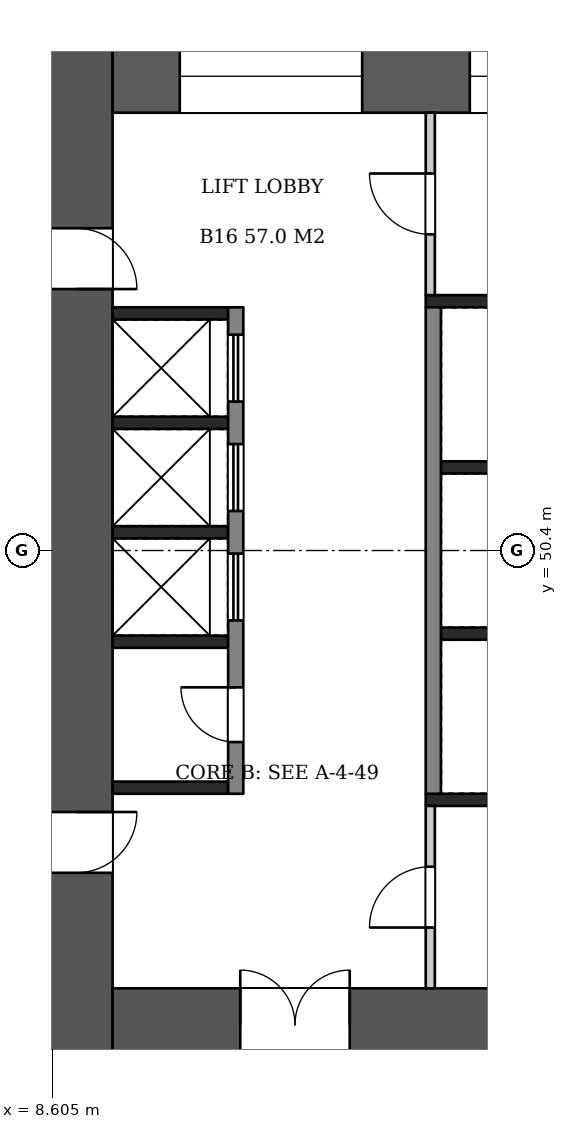
"""IFC4 building model, lengths in metres.
Left out: names, types, materials, properties, quantities, classifications, styles, units other than length and angle.
Written with IfcOpenShell. Run it as: python <this file> out.ifc"""

import sys

from ifc_helpers import new_model, si_unit, direction, frame, frame_2d, origin, place, context, subcontext, project, spatial, rectangle, extrude, element, fill, save


model = new_model("IFC4")
c1 = context("Model", 3, precision=1e-05, world=origin(), true_north=direction((0.0, 1.0)))
c2 = subcontext(c1, "Body", "Model", "MODEL_VIEW")
j1 = project(units=[si_unit("LENGTHUNIT", "METRE"), si_unit("PLANEANGLEUNIT", "RADIAN")], contexts=[c1])
p1 = place(None, origin())
s1 = spatial("IfcSite", under=j1, at=p1, CompositionType="ELEMENT")
p2 = place(p1, origin())
s2 = spatial("IfcBuilding", under=s1, at=p2, CompositionType="ELEMENT")
p3 = place(p2, frame((0.0, 0.0, 67.2)))
s3 = spatial("IfcBuildingStorey", under=s2, at=p3, CompositionType="ELEMENT", Elevation=67.2)
p4 = place(p3, frame((9.0, 58.8, 0.0), z_axis=(0.0, 0.0, 1.0), x_axis=(0.0, -1.0, 0.0)))
e1 = element("IfcWall", 1, at=p4, inside=s3, PredefinedType="SHEAR", context=c2, shape_type="SweptSolid", body=[
    extrude(rectangle(XDim=16.8, YDim=1.2, at=frame_2d((8.4, 0.0))), origin(), (0.0, 0.0, 1.0), 3.22),
])
p5 = place(p4, frame((3.1, 0.0, 0.0)))
e2 = element("IfcOpeningElement", 2, at=p5, cuts=e1, PredefinedType="OPENING", context=c2, shape_type="SweptSolid", body=[
    extrude(rectangle(XDim=1.0, YDim=2.1, at=frame_2d((0.5, 1.05))), frame((0.0, 0.61, 0.0), z_axis=(0.0, -1.0, 0.0), x_axis=(1.0, 0.0, 0.0)), (0.0, 0.0, 1.0), 1.22),
])
p6 = place(p4, frame((12.7, 0.0, 0.0)))
e3 = element("IfcOpeningElement", 3, at=p6, cuts=e1, PredefinedType="OPENING", context=c2, shape_type="SweptSolid", body=[
    extrude(rectangle(XDim=1.0, YDim=2.1, at=frame_2d((0.5, 1.05))), frame((0.0, 0.61, 0.0), z_axis=(0.0, -1.0, 0.0), x_axis=(1.0, 0.0, 0.0)), (0.0, 0.0, 1.0), 1.22),
])
p7 = place(p3, frame((9.6, 58.2, 0.0), z_axis=(0.0, 0.0, 1.0), x_axis=(1.0, 0.0, 0.0)))
e4 = element("IfcWall", 4, at=p7, inside=s3, PredefinedType="SHEAR", context=c2, shape_type="SweptSolid", body=[
    extrude(rectangle(XDim=14.4, YDim=1.2, at=frame_2d((7.2, 0.0))), origin(), (0.0, 0.0, 1.0), 3.22),
])
p8 = place(p7, frame((1.105, 0.0, 0.6)))
e5 = element("IfcOpeningElement", 5, at=p8, cuts=e4, PredefinedType="OPENING", context=c2, shape_type="SweptSolid", body=[
    extrude(rectangle(XDim=3.0, YDim=2.1, at=frame_2d((1.5, 1.05))), frame((0.0, 0.61, 0.0), z_axis=(0.0, -1.0, 0.0), x_axis=(1.0, 0.0, 0.0)), (0.0, 0.0, 1.0), 1.22),
])
p9 = place(p7, frame((5.875, 0.0, 0.6)))
e6 = element("IfcOpeningElement", 6, at=p9, cuts=e4, PredefinedType="OPENING", context=c2, shape_type="SweptSolid", body=[
    extrude(rectangle(XDim=2.4, YDim=2.1, at=frame_2d((1.2, 1.05))), frame((0.0, 0.61, 0.0), z_axis=(0.0, -1.0, 0.0), x_axis=(1.0, 0.0, 0.0)), (0.0, 0.0, 1.0), 1.22),
])
p10 = place(p7, frame((9.993, 0.0, 0.5)))
e7 = element("IfcOpeningElement", 7, at=p10, cuts=e4, PredefinedType="OPENING", context=c2, shape_type="SweptSolid", body=[
    extrude(rectangle(XDim=1.2, YDim=2.4, at=frame_2d((0.6, 1.2))), frame((0.0, 0.61, 0.0), z_axis=(0.0, -1.0, 0.0), x_axis=(1.0, 0.0, 0.0)), (0.0, 0.0, 1.0), 1.22),
])
p11 = place(p7, frame((12.197, 0.0, 0.5)))
e8 = element("IfcOpeningElement", 8, at=p11, cuts=e4, PredefinedType="OPENING", context=c2, shape_type="SweptSolid", body=[
    extrude(rectangle(XDim=1.2, YDim=2.4, at=frame_2d((0.6, 1.2))), frame((0.0, 0.61, 0.0), z_axis=(0.0, -1.0, 0.0), x_axis=(1.0, 0.0, 0.0)), (0.0, 0.0, 1.0), 1.22),
])
p12 = place(p3, frame((9.6, 42.6, 0.0), z_axis=(0.0, 0.0, 1.0), x_axis=(1.0, 0.0, 0.0)))
e9 = element("IfcWall", 9, at=p12, inside=s3, PredefinedType="SHEAR", context=c2, shape_type="SweptSolid", body=[
    extrude(rectangle(XDim=14.4, YDim=1.2, at=frame_2d((7.2, 0.0))), origin(), (0.0, 0.0, 1.0), 3.22),
])
p13 = place(p12, frame((2.1, 0.0, 0.0)))
e10 = element("IfcOpeningElement", 10, at=p13, cuts=e9, PredefinedType="OPENING", context=c2, shape_type="SweptSolid", body=[
    extrude(rectangle(XDim=1.8, YDim=2.1, at=frame_2d((0.9, 1.05))), frame((0.0, 0.61, 0.0), z_axis=(0.0, -1.0, 0.0), x_axis=(1.0, 0.0, 0.0)), (0.0, 0.0, 1.0), 1.22),
])
for number, where, z_axis, x_axis in (
    (11, (9.6, 54.3, 0.0), (0.0, 0.0, 1.0), (1.0, 0.0, 0.0)),
    (12, (9.6, 52.5, 0.0), (0.0, 0.0, 1.0), (1.0, 0.0, 0.0)),
    (13, (9.6, 50.7, 0.0), (0.0, 0.0, 1.0), (1.0, 0.0, 0.0)),
    (14, (9.6, 48.9, 0.0), (0.0, 0.0, 1.0), (1.0, 0.0, 0.0)),
    (15, (9.6, 46.5, 0.0), (0.0, 0.0, 1.0), (1.0, 0.0, 0.0)),
):
    element("IfcWall", number, at=place(p3, frame(where, z_axis=z_axis, x_axis=x_axis)), inside=s3, PredefinedType="SHEAR", context=c2, shape_type="SweptSolid", body=[
        extrude(rectangle(XDim=1.9, YDim=0.2, at=frame_2d((0.95, 0.0))), origin(), (0.0, 0.0, 1.0), 3.22),
    ])
p14 = place(p3, frame((11.625, 54.4, 0.0), z_axis=(0.0, 0.0, 1.0), x_axis=(0.0, -1.0, 0.0)))
e16 = element("IfcWall", 16, at=p14, inside=s3, PredefinedType="SHEAR", context=c2, shape_type="SweptSolid", body=[
    extrude(rectangle(XDim=8.0, YDim=0.25, at=frame_2d((4.0, 0.0))), origin(), (0.0, 0.0, 1.0), 3.22),
])
p15 = place(p14, frame((0.45, 0.0, 0.0)))
e17 = element("IfcOpeningElement", 17, at=p15, cuts=e16, PredefinedType="OPENING", context=c2, shape_type="SweptSolid", body=[
    extrude(rectangle(XDim=1.1, YDim=2.1, at=frame_2d((0.55, 1.05))), frame((0.0, 0.135, 0.0), z_axis=(0.0, -1.0, 0.0), x_axis=(1.0, 0.0, 0.0)), (0.0, 0.0, 1.0), 0.27),
])
p16 = place(p14, frame((2.25, 0.0, 0.0)))
e18 = element("IfcOpeningElement", 18, at=p16, cuts=e16, PredefinedType="OPENING", context=c2, shape_type="SweptSolid", body=[
    extrude(rectangle(XDim=1.1, YDim=2.1, at=frame_2d((0.55, 1.05))), frame((0.0, 0.135, 0.0), z_axis=(0.0, -1.0, 0.0), x_axis=(1.0, 0.0, 0.0)), (0.0, 0.0, 1.0), 0.27),
])
p17 = place(p14, frame((4.05, 0.0, 0.0)))
e19 = element("IfcOpeningElement", 19, at=p17, cuts=e16, PredefinedType="OPENING", context=c2, shape_type="SweptSolid", body=[
    extrude(rectangle(XDim=1.1, YDim=2.1, at=frame_2d((0.55, 1.05))), frame((0.0, 0.135, 0.0), z_axis=(0.0, -1.0, 0.0), x_axis=(1.0, 0.0, 0.0)), (0.0, 0.0, 1.0), 0.27),
])
p18 = place(p14, frame((6.25, 0.0, 0.0)))
e20 = element("IfcOpeningElement", 20, at=p18, cuts=e16, PredefinedType="OPENING", context=c2, shape_type="SweptSolid", body=[
    extrude(rectangle(XDim=0.9, YDim=2.1, at=frame_2d((0.45, 1.05))), frame((0.0, 0.135, 0.0), z_axis=(0.0, -1.0, 0.0), x_axis=(1.0, 0.0, 0.0)), (0.0, 0.0, 1.0), 0.27),
])
for number, where, z_axis, x_axis in (
    (21, (15.0, 51.767, 0.0), (0.0, 0.0, 1.0), (1.0, 0.0, 0.0)),
    (22, (15.0, 49.033, 0.0), (0.0, 0.0, 1.0), (1.0, 0.0, 0.0)),
):
    element("IfcWall", number, at=place(p3, frame(where, z_axis=z_axis, x_axis=x_axis)), inside=s3, PredefinedType="SHEAR", context=c2, shape_type="SweptSolid", body=[
        extrude(rectangle(XDim=1.9, YDim=0.2, at=frame_2d((0.95, 0.0))), origin(), (0.0, 0.0, 1.0), 3.22),
    ])
p19 = place(p3, frame((14.875, 54.4, 0.0), z_axis=(0.0, 0.0, 1.0), x_axis=(0.0, -1.0, 0.0)))
e23 = element("IfcWall", 23, at=p19, inside=s3, PredefinedType="SHEAR", context=c2, shape_type="SweptSolid", body=[
    extrude(rectangle(XDim=8.0, YDim=0.25, at=frame_2d((4.0, 0.0))), origin(), (0.0, 0.0, 1.0), 3.22),
])
p20 = place(p3, frame((14.75, 54.5, 0.0), z_axis=(0.0, 0.0, 1.0), x_axis=(1.0, 0.0, 0.0)))
e24 = element("IfcWall", 24, at=p20, inside=s3, PredefinedType="SHEAR", context=c2, shape_type="SweptSolid", body=[
    extrude(rectangle(XDim=2.4, YDim=0.2, at=frame_2d((1.2, 0.0))), origin(), (0.0, 0.0, 1.0), 3.22),
])
p21 = place(p3, frame((14.825, 57.6, 0.0), z_axis=(0.0, 0.0, 1.0), x_axis=(0.0, -1.0, 0.0)))
e25 = element("IfcWall", 25, at=p21, inside=s3, PredefinedType="PARTITIONING", context=c2, shape_type="SweptSolid", body=[
    extrude(rectangle(XDim=3.0, YDim=0.15, at=frame_2d((1.5, 0.0))), origin(), (0.0, 0.0, 1.0), 3.22),
])
p22 = place(p21, frame((1.0, 0.0, 0.0)))
e26 = element("IfcOpeningElement", 26, at=p22, cuts=e25, PredefinedType="OPENING", context=c2, shape_type="SweptSolid", body=[
    extrude(rectangle(XDim=1.0, YDim=2.1, at=frame_2d((0.5, 1.05))), frame((0.0, 0.085, 0.0), z_axis=(0.0, -1.0, 0.0), x_axis=(1.0, 0.0, 0.0)), (0.0, 0.0, 1.0), 0.17),
])
p23 = place(p3, frame((14.75, 46.3, 0.0), z_axis=(0.0, 0.0, 1.0), x_axis=(1.0, 0.0, 0.0)))
e27 = element("IfcWall", 27, at=p23, inside=s3, PredefinedType="SHEAR", context=c2, shape_type="SweptSolid", body=[
    extrude(rectangle(XDim=2.4, YDim=0.2, at=frame_2d((1.2, 0.0))), origin(), (0.0, 0.0, 1.0), 3.22),
])
p24 = place(p3, frame((14.825, 46.2, 0.0), z_axis=(0.0, 0.0, 1.0), x_axis=(0.0, -1.0, 0.0)))
e28 = element("IfcWall", 28, at=p24, inside=s3, PredefinedType="PARTITIONING", context=c2, shape_type="SweptSolid", body=[
    extrude(rectangle(XDim=3.0, YDim=0.15, at=frame_2d((1.5, 0.0))), origin(), (0.0, 0.0, 1.0), 3.22),
])
p25 = place(p24, frame((1.0, 0.0, 0.0)))
e29 = element("IfcOpeningElement", 29, at=p25, cuts=e28, PredefinedType="OPENING", context=c2, shape_type="SweptSolid", body=[
    extrude(rectangle(XDim=1.0, YDim=2.1, at=frame_2d((0.5, 1.05))), frame((0.0, 0.085, 0.0), z_axis=(0.0, -1.0, 0.0), x_axis=(1.0, 0.0, 0.0)), (0.0, 0.0, 1.0), 0.17),
])
p26 = place(p5, origin())
e30 = element("IfcDoor", 30, at=p26, inside=s3, OperationType="SINGLE_SWING_RIGHT", PredefinedType="DOOR", context=c2, shape_type="SweptSolid", body=[
    extrude(rectangle(XDim=1.0, YDim=2.1, at=frame_2d((0.5, 1.05))), frame((0.0, 0.025, 0.0), z_axis=(0.0, -1.0, 0.0), x_axis=(1.0, 0.0, 0.0)), (0.0, 0.0, 1.0), 0.05),
])
fill(e2, e30)
p27 = place(p6, origin())
e31 = element("IfcDoor", 31, at=p27, inside=s3, OperationType="SINGLE_SWING_LEFT", PredefinedType="DOOR", context=c2, shape_type="SweptSolid", body=[
    extrude(rectangle(XDim=1.0, YDim=2.1, at=frame_2d((0.5, 1.05))), frame((0.0, 0.025, 0.0), z_axis=(0.0, -1.0, 0.0), x_axis=(1.0, 0.0, 0.0)), (0.0, 0.0, 1.0), 0.05),
])
fill(e3, e31)
p28 = place(p13, origin())
e32 = element("IfcDoor", 32, at=p28, inside=s3, OperationType="DOUBLE_DOOR_SINGLE_SWING", PredefinedType="DOOR", context=c2, shape_type="SweptSolid", body=[
    extrude(rectangle(XDim=1.8, YDim=2.1, at=frame_2d((0.9, 1.05))), frame((0.0, 0.025, 0.0), z_axis=(0.0, -1.0, 0.0), x_axis=(1.0, 0.0, 0.0)), (0.0, 0.0, 1.0), 0.05),
])
fill(e10, e32)
p29 = place(p15, origin())
e33 = element("IfcDoor", 33, at=p29, inside=s3, OperationType="DOUBLE_DOOR_SLIDING", PredefinedType="DOOR", context=c2, shape_type="SweptSolid", body=[
    extrude(rectangle(XDim=1.1, YDim=2.1, at=frame_2d((0.55, 1.05))), frame((0.0, 0.025, 0.0), z_axis=(0.0, -1.0, 0.0), x_axis=(1.0, 0.0, 0.0)), (0.0, 0.0, 1.0), 0.05),
])
fill(e17, e33)
p30 = place(p16, origin())
e34 = element("IfcDoor", 34, at=p30, inside=s3, OperationType="DOUBLE_DOOR_SLIDING", PredefinedType="DOOR", context=c2, shape_type="SweptSolid", body=[
    extrude(rectangle(XDim=1.1, YDim=2.1, at=frame_2d((0.55, 1.05))), frame((0.0, 0.025, 0.0), z_axis=(0.0, -1.0, 0.0), x_axis=(1.0, 0.0, 0.0)), (0.0, 0.0, 1.0), 0.05),
])
fill(e18, e34)
p31 = place(p17, origin())
e35 = element("IfcDoor", 35, at=p31, inside=s3, OperationType="DOUBLE_DOOR_SLIDING", PredefinedType="DOOR", context=c2, shape_type="SweptSolid", body=[
    extrude(rectangle(XDim=1.1, YDim=2.1, at=frame_2d((0.55, 1.05))), frame((0.0, 0.025, 0.0), z_axis=(0.0, -1.0, 0.0), x_axis=(1.0, 0.0, 0.0)), (0.0, 0.0, 1.0), 0.05),
])
fill(e19, e35)
p32 = place(p18, frame((0.9, 0.0, 0.0), z_axis=(0.0, 0.0, 1.0), x_axis=(-1.0, 0.0, 0.0)))
e36 = element("IfcDoor", 36, at=p32, inside=s3, OperationType="SINGLE_SWING_RIGHT", PredefinedType="DOOR", context=c2, shape_type="SweptSolid", body=[
    extrude(rectangle(XDim=0.9, YDim=2.1, at=frame_2d((0.45, 1.05))), frame((0.0, 0.025, 0.0), z_axis=(0.0, -1.0, 0.0), x_axis=(1.0, 0.0, 0.0)), (0.0, 0.0, 1.0), 0.05),
])
fill(e20, e36)
p33 = place(p22, frame((1.0, 0.0, 0.0), z_axis=(0.0, 0.0, 1.0), x_axis=(-1.0, 0.0, 0.0)))
e37 = element("IfcDoor", 37, at=p33, inside=s3, OperationType="SINGLE_SWING_RIGHT", PredefinedType="DOOR", context=c2, shape_type="SweptSolid", body=[
    extrude(rectangle(XDim=1.0, YDim=2.1, at=frame_2d((0.5, 1.05))), frame((0.0, 0.025, 0.0), z_axis=(0.0, -1.0, 0.0), x_axis=(1.0, 0.0, 0.0)), (0.0, 0.0, 1.0), 0.05),
])
fill(e26, e37)
p34 = place(p25, frame((1.0, 0.0, 0.0), z_axis=(0.0, 0.0, 1.0), x_axis=(-1.0, 0.0, 0.0)))
e38 = element("IfcDoor", 38, at=p34, inside=s3, OperationType="SINGLE_SWING_LEFT", PredefinedType="DOOR", context=c2, shape_type="SweptSolid", body=[
    extrude(rectangle(XDim=1.0, YDim=2.1, at=frame_2d((0.5, 1.05))), frame((0.0, 0.025, 0.0), z_axis=(0.0, -1.0, 0.0), x_axis=(1.0, 0.0, 0.0)), (0.0, 0.0, 1.0), 0.05),
])
fill(e29, e38)
p35 = place(p8, origin())
e39 = element("IfcWindow", 39, at=p35, inside=s3, PartitioningType="SINGLE_PANEL", PredefinedType="WINDOW", context=c2, shape_type="SweptSolid", body=[
    extrude(rectangle(XDim=3.0, YDim=2.1, at=frame_2d((1.5, 1.05))), frame((0.0, 0.03, 0.0), z_axis=(0.0, -1.0, 0.0), x_axis=(1.0, 0.0, 0.0)), (0.0, 0.0, 1.0), 0.06),
])
fill(e5, e39)
p36 = place(p9, origin())
e40 = element("IfcWindow", 40, at=p36, inside=s3, PartitioningType="SINGLE_PANEL", PredefinedType="WINDOW", context=c2, shape_type="SweptSolid", body=[
    extrude(rectangle(XDim=2.4, YDim=2.1, at=frame_2d((1.2, 1.05))), frame((0.0, 0.03, 0.0), z_axis=(0.0, -1.0, 0.0), x_axis=(1.0, 0.0, 0.0)), (0.0, 0.0, 1.0), 0.06),
])
fill(e6, e40)
save(model, sys.argv[1])
